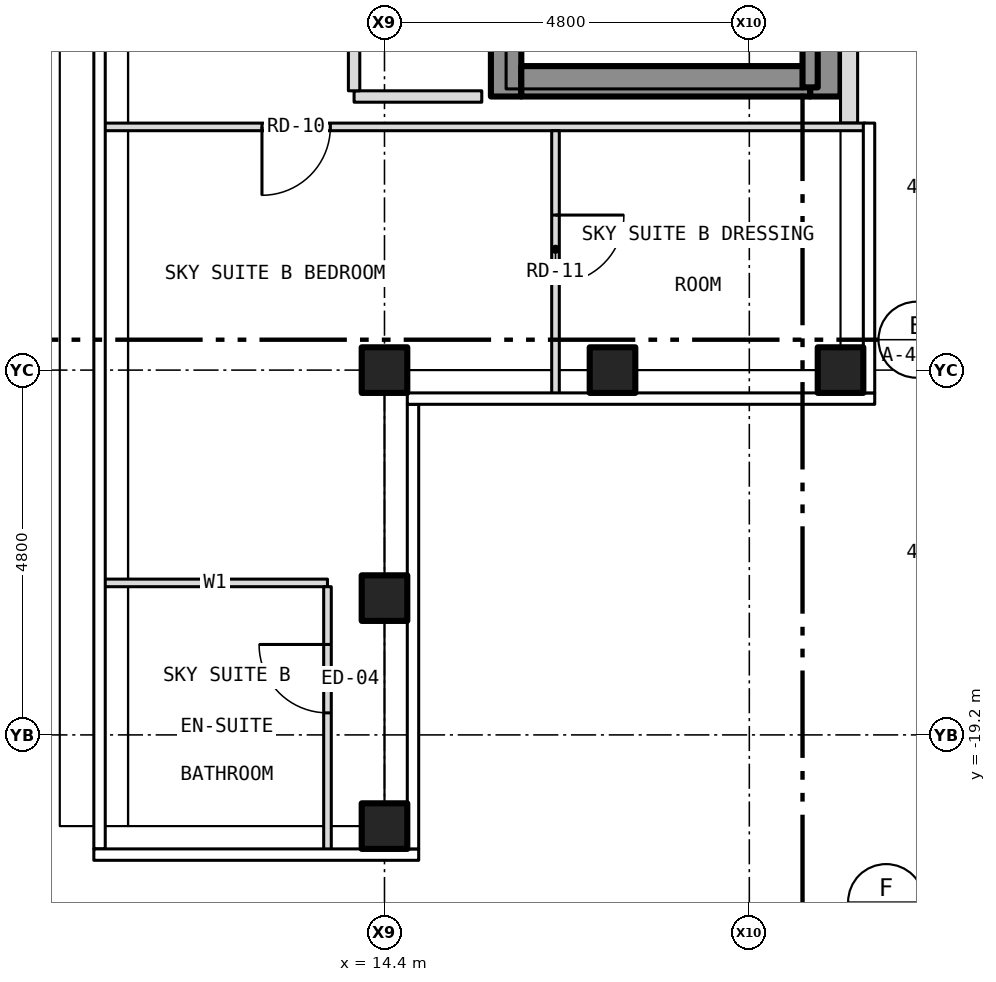
"""IFC4 building model, lengths in metres.
Left out: names, types, materials, properties, quantities, classifications, styles, units other than length and angle.
Written with IfcOpenShell. Run it as: python <this file> out.ifc"""

import sys

from ifc_helpers import new_model, si_unit, direction, frame, frame_2d, origin, origin_2d, place, context, subcontext, project, spatial, rectangle, hollow_rectangle, extrude, element, fill, save


model = new_model("IFC4")
c1 = context("Model", 3, precision=1e-05, world=origin(), true_north=direction((0.0, 1.0)))
c2 = subcontext(c1, "Body", "Model", "MODEL_VIEW")
j1 = project(units=[si_unit("LENGTHUNIT", "METRE"), si_unit("PLANEANGLEUNIT", "RADIAN")], contexts=[c1])
p1 = place(None, origin())
s1 = spatial("IfcSite", under=j1, at=p1, CompositionType="ELEMENT")
p2 = place(p1, origin())
s2 = spatial("IfcBuilding", under=s1, at=p2, CompositionType="ELEMENT")
p3 = place(p2, frame((0.0, 0.0, 283.0)))
s3 = spatial("IfcBuildingStorey", under=s2, at=p3, CompositionType="ELEMENT", Elevation=283.0)
for number, where, z_axis, x_axis in (
    (1, (14.4, -20.4, -0.15), (0.0, 0.0, 1.0), (1.0, 0.0, 0.0)),
    (2, (20.4, -14.4, -0.15), (0.0, 0.0, 1.0), (1.0, 0.0, 0.0)),
    (3, (14.4, -14.4, -0.15), (0.0, 0.0, 1.0), (1.0, 0.0, 0.0)),
    (4, (14.4, -17.4, -0.15), (0.0, 0.0, 1.0), (1.0, 0.0, 0.0)),
    (5, (17.4, -14.4, -0.15), (0.0, 0.0, 1.0), (1.0, 0.0, 0.0)),
):
    element("IfcColumn", number, at=place(p3, frame(where, z_axis=z_axis, x_axis=x_axis)), inside=s3, PredefinedType="COLUMN", context=c2, shape_type="SweptSolid", body=[
        extrude(hollow_rectangle(XDim=0.6, YDim=0.6, WallThickness=0.03, at=origin_2d()), origin(), (0.0, 0.0, 1.0), 3.5),
    ])
p4 = place(p3, frame((16.0, -10.8, 0.0), z_axis=(0.0, 0.0, 1.0), x_axis=(0.0, 1.0, 0.0)))
e6 = element("IfcWall", 6, at=p4, inside=s3, PredefinedType="SHEAR", context=c2, shape_type="SweptSolid", body=[
    extrude(rectangle(XDim=21.6, YDim=0.4, at=frame_2d((10.8, 0.0))), origin(), (0.0, 0.0, 1.0), 3.25),
])
p5 = place(p4, frame((9.4, 0.0, 0.0)))
e7 = element("IfcOpeningElement", 7, at=p5, cuts=e6, PredefinedType="OPENING", context=c2, shape_type="SweptSolid", body=[
    extrude(rectangle(XDim=1.1, YDim=2.1, at=frame_2d((0.55, 1.05))), frame((0.0, 0.212, 0.0), z_axis=(0.0, -1.0, 0.0), x_axis=(1.0, 0.0, 0.0)), (0.0, 0.0, 1.0), 0.424),
])
p6 = place(p4, frame((11.5, 0.0, 0.0)))
e8 = element("IfcOpeningElement", 8, at=p6, cuts=e6, PredefinedType="OPENING", context=c2, shape_type="SweptSolid", body=[
    extrude(rectangle(XDim=1.1, YDim=2.1, at=frame_2d((0.55, 1.05))), frame((0.0, 0.212, 0.0), z_axis=(0.0, -1.0, 0.0), x_axis=(1.0, 0.0, 0.0)), (0.0, 0.0, 1.0), 0.424),
])
p7 = place(p4, frame((13.6, 0.0, 0.0)))
e9 = element("IfcOpeningElement", 9, at=p7, cuts=e6, PredefinedType="OPENING", context=c2, shape_type="SweptSolid", body=[
    extrude(rectangle(XDim=1.1, YDim=2.1, at=frame_2d((0.55, 1.05))), frame((0.0, 0.212, 0.0), z_axis=(0.0, -1.0, 0.0), x_axis=(1.0, 0.0, 0.0)), (0.0, 0.0, 1.0), 0.424),
])
p8 = place(p4, frame((15.7, 0.0, 0.0)))
e10 = element("IfcOpeningElement", 10, at=p8, cuts=e6, PredefinedType="OPENING", context=c2, shape_type="SweptSolid", body=[
    extrude(rectangle(XDim=1.1, YDim=2.1, at=frame_2d((0.55, 1.05))), frame((0.0, 0.212, 0.0), z_axis=(0.0, -1.0, 0.0), x_axis=(1.0, 0.0, 0.0)), (0.0, 0.0, 1.0), 0.424),
])
p9 = place(p4, frame((17.8, 0.0, 0.0)))
e11 = element("IfcOpeningElement", 11, at=p9, cuts=e6, PredefinedType="OPENING", context=c2, shape_type="SweptSolid", body=[
    extrude(rectangle(XDim=1.1, YDim=2.1, at=frame_2d((0.55, 1.05))), frame((0.0, 0.212, 0.0), z_axis=(0.0, -1.0, 0.0), x_axis=(1.0, 0.0, 0.0)), (0.0, 0.0, 1.0), 0.424),
])
p10 = place(p4, frame((5.642, 0.0, 0.0)))
e12 = element("IfcOpeningElement", 12, at=p10, cuts=e6, PredefinedType="OPENING", context=c2, shape_type="SweptSolid", body=[
    extrude(rectangle(XDim=1.1, YDim=2.1, at=frame_2d((0.55, 1.05))), frame((0.0, 0.212, 0.0), z_axis=(0.0, -1.0, 0.0), x_axis=(1.0, 0.0, 0.0)), (0.0, 0.0, 1.0), 0.424),
])
p11 = place(p4, frame((7.5, 0.0, 0.0)))
e13 = element("IfcOpeningElement", 13, at=p11, cuts=e6, PredefinedType="OPENING", context=c2, shape_type="SweptSolid", body=[
    extrude(rectangle(XDim=1.1, YDim=2.1, at=frame_2d((0.55, 1.05))), frame((0.0, 0.212, 0.0), z_axis=(0.0, -1.0, 0.0), x_axis=(1.0, 0.0, 0.0)), (0.0, 0.0, 1.0), 0.424),
])
p12 = place(p4, frame((20.0, 0.0, 0.0)))
e14 = element("IfcOpeningElement", 14, at=p12, cuts=e6, PredefinedType="OPENING", context=c2, shape_type="SweptSolid", body=[
    extrude(rectangle(XDim=0.9, YDim=2.1, at=frame_2d((0.45, 1.05))), frame((0.0, 0.212, 0.0), z_axis=(0.0, -1.0, 0.0), x_axis=(1.0, 0.0, 0.0)), (0.0, 0.0, 1.0), 0.424),
])
p13 = place(p3, frame((20.2, -10.8, 0.0), z_axis=(0.0, 0.0, 1.0), x_axis=(0.0, 1.0, 0.0)))
e15 = element("IfcWall", 15, at=p13, inside=s3, PredefinedType="SHEAR", context=c2, shape_type="SweptSolid", body=[
    extrude(rectangle(XDim=21.6, YDim=0.4, at=frame_2d((10.8, 0.0))), origin(), (0.0, 0.0, 1.0), 3.25),
])
p14 = place(p3, frame((16.2, -10.6, 0.0), z_axis=(0.0, 0.0, 1.0), x_axis=(1.0, 0.0, 0.0)))
e16 = element("IfcWall", 16, at=p14, inside=s3, PredefinedType="SHEAR", context=c2, shape_type="SweptSolid", body=[
    extrude(rectangle(XDim=3.8, YDim=0.4, at=frame_2d((1.9, 0.0))), origin(), (0.0, 0.0, 1.0), 3.25),
])
p15 = place(p3, frame((20.512, -11.15, 0.0), z_axis=(0.0, 0.0, 1.0), x_axis=(0.0, 1.0, 0.0)))
e17 = element("IfcWall", 17, at=p15, inside=s3, PredefinedType="SOLIDWALL", context=c2, shape_type="SweptSolid", body=[
    extrude(rectangle(XDim=22.3, YDim=0.225, at=frame_2d((11.15, 0.0))), origin(), (0.0, 0.0, 1.0), 3.5),
])
p16 = place(p15, frame((3.3, 0.0, 1.0)))
e18 = element("IfcOpeningElement", 18, at=p16, cuts=e17, PredefinedType="OPENING", context=c2, shape_type="SweptSolid", body=[
    extrude(rectangle(XDim=0.6, YDim=1.5, at=frame_2d((0.3, 0.75))), frame((0.0, 0.125, 0.0), z_axis=(0.0, -1.0, 0.0), x_axis=(1.0, 0.0, 0.0)), (0.0, 0.0, 1.0), 0.249),
])
p17 = place(p3, frame((10.696, -17.2, 0.0), z_axis=(0.0, 0.0, 1.0), x_axis=(1.0, 0.0, 0.0)))
e19 = element("IfcWall", 19, at=p17, inside=s3, PredefinedType="PARTITIONING", context=c2, shape_type="SweptSolid", body=[
    extrude(rectangle(XDim=2.954, YDim=0.1, at=frame_2d((1.477, 0.0))), origin(), (0.0, 0.0, 1.0), 3.35),
])
p18 = place(p3, frame((10.696, -11.2, 0.0), z_axis=(0.0, 0.0, 1.0), x_axis=(1.0, 0.0, 0.0)))
e20 = element("IfcWall", 20, at=p18, inside=s3, PredefinedType="PARTITIONING", context=c2, shape_type="SweptSolid", body=[
    extrude(rectangle(XDim=10.034, YDim=0.1, at=frame_2d((5.017, 0.0))), origin(), (0.0, 0.0, 1.0), 3.35),
])
p19 = place(p18, frame((2.092, 0.0, 0.0)))
e21 = element("IfcOpeningElement", 21, at=p19, cuts=e20, PredefinedType="OPENING", context=c2, shape_type="SweptSolid", body=[
    extrude(rectangle(XDim=0.9, YDim=2.1, at=frame_2d((0.45, 1.05))), frame((0.0, 0.062, 0.0), z_axis=(0.0, -1.0, 0.0), x_axis=(1.0, 0.0, 0.0)), (0.0, 0.0, 1.0), 0.124),
])
p20 = place(p3, frame((14.0, -10.8, 0.0), z_axis=(0.0, 0.0, 1.0), x_axis=(1.0, 0.0, 0.0)))
e22 = element("IfcWall", 22, at=p20, inside=s3, PredefinedType="PARTITIONING", context=c2, shape_type="SweptSolid", body=[
    extrude(rectangle(XDim=1.68, YDim=0.15, at=frame_2d((0.84, 0.0))), origin(), (0.0, 0.0, 1.0), 3.35),
])
p21 = place(p3, frame((13.65, -20.73, 0.0), z_axis=(0.0, 0.0, 1.0), x_axis=(0.0, 1.0, 0.0)))
e23 = element("IfcWall", 23, at=p21, inside=s3, PredefinedType="PARTITIONING", context=c2, shape_type="SweptSolid", body=[
    extrude(rectangle(XDim=3.48, YDim=0.1, at=frame_2d((1.74, 0.0))), origin(), (0.0, 0.0, 1.0), 3.35),
])
p22 = place(p21, frame((1.82, 0.0, 0.0)))
e24 = element("IfcOpeningElement", 24, at=p22, cuts=e23, PredefinedType="OPENING", context=c2, shape_type="SweptSolid", body=[
    extrude(rectangle(XDim=0.9, YDim=2.1, at=frame_2d((0.45, 1.05))), frame((0.0, 0.062, 0.0), z_axis=(0.0, -1.0, 0.0), x_axis=(1.0, 0.0, 0.0)), (0.0, 0.0, 1.0), 0.124),
])
p23 = place(p3, frame((14.0, -10.725, 0.0), z_axis=(0.0, 0.0, 1.0), x_axis=(0.0, 1.0, 0.0)))
e25 = element("IfcWall", 25, at=p23, inside=s3, PredefinedType="PARTITIONING", context=c2, shape_type="SweptSolid", body=[
    extrude(rectangle(XDim=8.725, YDim=0.15, at=frame_2d((4.363, 0.0))), origin(), (0.0, 0.0, 1.0), 3.35),
])
p24 = place(p23, frame((3.925, 0.0, 0.0)))
e26 = element("IfcOpeningElement", 26, at=p24, cuts=e25, PredefinedType="OPENING", context=c2, shape_type="SweptSolid", body=[
    extrude(rectangle(XDim=0.9, YDim=2.1, at=frame_2d((0.45, 1.05))), frame((0.0, 0.087, 0.0), z_axis=(0.0, -1.0, 0.0), x_axis=(1.0, 0.0, 0.0)), (0.0, 0.0, 1.0), 0.174),
])
p25 = place(p3, frame((16.65, -14.73, 0.0), z_axis=(0.0, 0.0, 1.0), x_axis=(0.0, 1.0, 0.0)))
e27 = element("IfcWall", 27, at=p25, inside=s3, PredefinedType="PARTITIONING", context=c2, shape_type="SweptSolid", body=[
    extrude(rectangle(XDim=3.48, YDim=0.1, at=frame_2d((1.74, 0.0))), origin(), (0.0, 0.0, 1.0), 3.35),
])
p26 = place(p25, frame((1.47, 0.0, 0.0)))
e28 = element("IfcOpeningElement", 28, at=p26, cuts=e27, PredefinedType="OPENING", context=c2, shape_type="SweptSolid", body=[
    extrude(rectangle(XDim=0.9, YDim=2.1, at=frame_2d((0.45, 1.05))), frame((0.0, 0.062, 0.0), z_axis=(0.0, -1.0, 0.0), x_axis=(1.0, 0.0, 0.0)), (0.0, 0.0, 1.0), 0.124),
])
p27 = place(p3, frame((20.0, -10.68, 0.0), z_axis=(0.0, 0.0, 1.0), x_axis=(0.0, 1.0, 0.0)))
e29 = element("IfcWall", 29, at=p27, inside=s3, PredefinedType="SHEAR", context=c2, shape_type="SweptSolid", body=[
    extrude(rectangle(XDim=6.98, YDim=0.2, at=frame_2d((3.49, 0.0))), origin(), (0.0, 0.0, 1.0), 3.25),
])
p28 = place(p19, origin())
e30 = element("IfcDoor", 30, at=p28, inside=s3, OperationType="SINGLE_SWING_LEFT", PredefinedType="DOOR", context=c2, shape_type="SweptSolid", body=[
    extrude(rectangle(XDim=0.9, YDim=2.1, at=frame_2d((0.45, 1.05))), frame((0.0, 0.025, 0.0), z_axis=(0.0, -1.0, 0.0), x_axis=(1.0, 0.0, 0.0)), (0.0, 0.0, 1.0), 0.05),
])
fill(e21, e30)
p29 = place(p22, origin())
e31 = element("IfcDoor", 31, at=p29, inside=s3, OperationType="SINGLE_SWING_RIGHT", PredefinedType="DOOR", context=c2, shape_type="SweptSolid", body=[
    extrude(rectangle(XDim=0.9, YDim=2.1, at=frame_2d((0.45, 1.05))), frame((0.0, 0.025, 0.0), z_axis=(0.0, -1.0, 0.0), x_axis=(1.0, 0.0, 0.0)), (0.0, 0.0, 1.0), 0.05),
])
fill(e24, e31)
p30 = place(p26, origin())
e32 = element("IfcDoor", 32, at=p30, inside=s3, OperationType="SINGLE_SWING_RIGHT", PredefinedType="DOOR", context=c2, shape_type="SweptSolid", body=[
    extrude(rectangle(XDim=0.9, YDim=2.1, at=frame_2d((0.45, 1.05))), frame((0.0, 0.025, 0.0), z_axis=(0.0, -1.0, 0.0), x_axis=(1.0, 0.0, 0.0)), (0.0, 0.0, 1.0), 0.05),
])
fill(e28, e32)
save(model, sys.argv[1])
